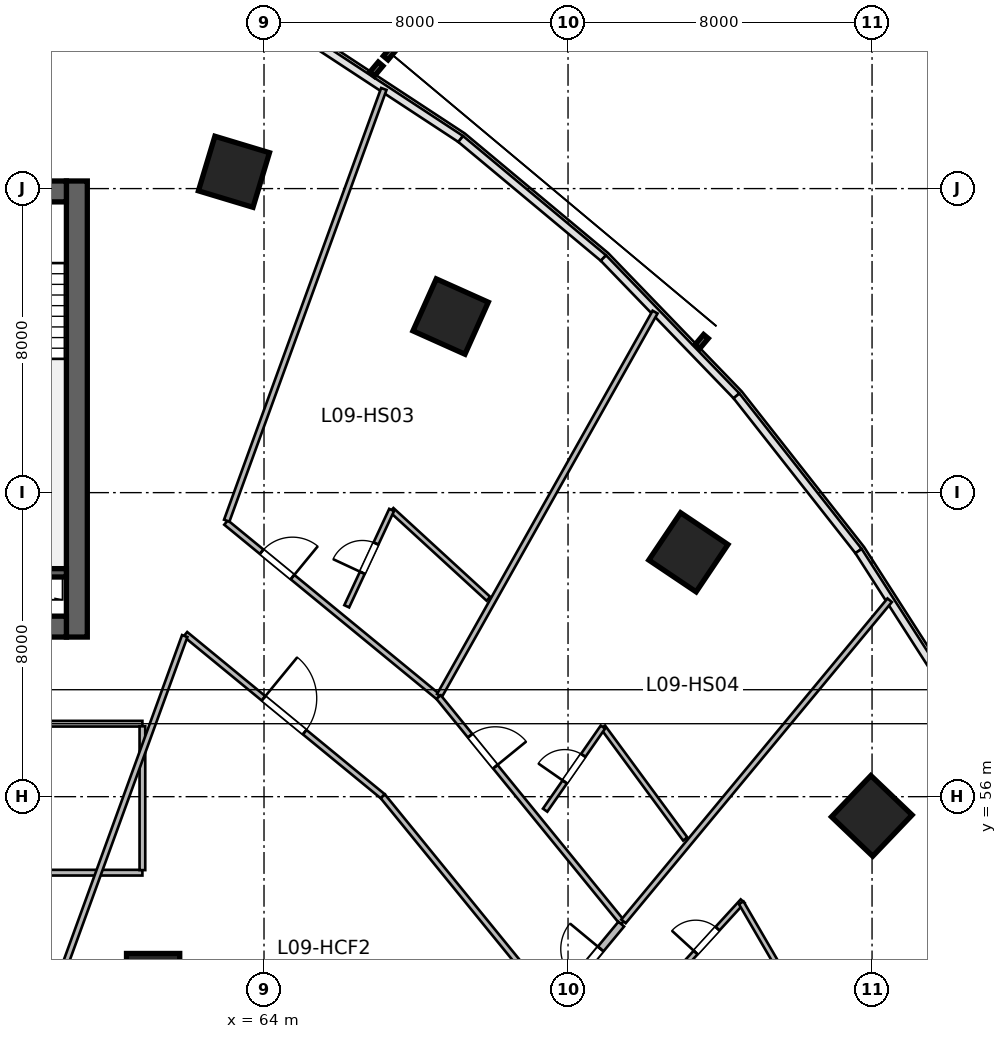
"""IFC4 building model, lengths in metres.
Left out: names, types, materials, properties, quantities, classifications, styles, units other than length and angle.
Written with IfcOpenShell. Run it as: python <this file> out.ifc"""

import sys

from ifc_helpers import new_model, si_unit, direction, frame, frame_2d, origin, origin_2d, place, context, subcontext, project, spatial, rectangle, circle, extrude, source, transform, mapped, element, fill, save


model = new_model("IFC4")
c1 = context("Model", 3, precision=1e-05, world=origin(), true_north=direction((0.0, 1.0)))
c2 = subcontext(c1, "Body", "Model", "MODEL_VIEW")
j1 = project(units=[si_unit("LENGTHUNIT", "METRE"), si_unit("PLANEANGLEUNIT", "RADIAN")], contexts=[c1])
p1 = place(None, origin())
s1 = spatial("IfcSite", under=j1, at=p1, CompositionType="ELEMENT")
p2 = place(p1, origin())
s2 = spatial("IfcBuilding", under=s1, at=p2, CompositionType="ELEMENT")
p3 = place(p2, frame((0.0, 0.0, 46.2)))
s3 = spatial("IfcBuildingStorey", under=s2, at=p3, CompositionType="ELEMENT", Elevation=46.2)
m1 = source(origin(), c2, "Body", "SweptSolid", [
    extrude(rectangle(XDim=12.0, YDim=0.55, at=frame_2d((6.0, 0.0))), origin(), (0.0, 0.0, 1.0), 3.6),
])
p4 = place(p3, frame((59.075, 60.2, 0.0), z_axis=(0.0, 0.0, 1.0), x_axis=(0.0, 1.0, 0.0)))
e1 = element("IfcWall", 1, at=p4, inside=s3, PredefinedType="SHEAR", context=c2, shape_type="MappedRepresentation", body=[
    mapped(m1, transform((0.0, 0.0, 0.0), scale=1.0)),
])
m2 = source(origin(), c2, "Body", "SweptSolid", [
    extrude(rectangle(XDim=21.6, YDim=0.55, at=frame_2d((10.8, 0.0))), origin(), (0.0, 0.0, 1.0), 3.6),
])
p5 = place(p3, frame((37.2, 60.475, 0.0), z_axis=(0.0, 0.0, 1.0), x_axis=(1.0, 0.0, 0.0)))
e2 = element("IfcWall", 2, at=p5, inside=s3, PredefinedType="SHEAR", context=c2, shape_type="MappedRepresentation", body=[
    mapped(m2, transform((0.0, 0.0, 0.0), scale=1.0)),
])
p6 = place(p5, frame((1.1, 0.0, 0.0)))
e3 = element("IfcOpeningElement", 3, at=p6, cuts=e2, PredefinedType="OPENING", context=c2, shape_type="SweptSolid", body=[
    extrude(rectangle(XDim=1.15, YDim=2.15, at=frame_2d((0.575, 1.075))), frame((0.0, 0.285, 0.0), z_axis=(0.0, -1.0, 0.0), x_axis=(1.0, 0.0, 0.0)), (0.0, 0.0, 1.0), 0.57),
])
p7 = place(p5, frame((19.5, 0.0, 0.0)))
e4 = element("IfcOpeningElement", 4, at=p7, cuts=e2, PredefinedType="OPENING", context=c2, shape_type="SweptSolid", body=[
    extrude(rectangle(XDim=0.9, YDim=2.1, at=frame_2d((0.45, 1.05))), frame((0.0, 0.285, 0.0), z_axis=(0.0, -1.0, 0.0), x_axis=(1.0, 0.0, 0.0)), (0.0, 0.0, 1.0), 0.57),
])
p8 = place(p5, frame((12.02, 0.0, 0.0)))
e5 = element("IfcOpeningElement", 5, at=p8, cuts=e2, PredefinedType="OPENING", context=c2, shape_type="SweptSolid", body=[
    extrude(rectangle(XDim=1.6, YDim=2.15, at=frame_2d((0.8, 1.075))), frame((0.0, 0.285, 0.0), z_axis=(0.0, -1.0, 0.0), x_axis=(1.0, 0.0, 0.0)), (0.0, 0.0, 1.0), 0.57),
])
p9 = place(p3, frame((37.2, 71.925, 0.0), z_axis=(0.0, 0.0, 1.0), x_axis=(1.0, 0.0, 0.0)))
e6 = element("IfcWall", 6, at=p9, inside=s3, PredefinedType="SHEAR", context=c2, shape_type="MappedRepresentation", body=[
    mapped(m2, transform((0.0, 0.0, 0.0), scale=1.0)),
])
p10 = place(p9, frame((1.2, 0.0, 0.0)))
e7 = element("IfcOpeningElement", 7, at=p10, cuts=e6, PredefinedType="OPENING", context=c2, shape_type="SweptSolid", body=[
    extrude(rectangle(XDim=0.9, YDim=2.1, at=frame_2d((0.45, 1.05))), frame((0.0, 0.285, 0.0), z_axis=(0.0, -1.0, 0.0), x_axis=(1.0, 0.0, 0.0)), (0.0, 0.0, 1.0), 0.57),
])
p11 = place(p9, frame((14.7, 0.0, 0.0)))
e8 = element("IfcOpeningElement", 8, at=p11, cuts=e6, PredefinedType="OPENING", context=c2, shape_type="SweptSolid", body=[
    extrude(rectangle(XDim=1.2, YDim=2.15, at=frame_2d((0.6, 1.075))), frame((0.0, 0.285, 0.0), z_axis=(0.0, -1.0, 0.0), x_axis=(1.0, 0.0, 0.0)), (0.0, 0.0, 1.0), 0.57),
])
p12 = place(p9, frame((4.15, 0.0, 0.0)))
e9 = element("IfcOpeningElement", 9, at=p12, cuts=e6, PredefinedType="OPENING", context=c2, shape_type="SweptSolid", body=[
    extrude(rectangle(XDim=1.3, YDim=2.15, at=frame_2d((0.65, 1.075))), frame((0.0, 0.285, 0.0), z_axis=(0.0, -1.0, 0.0), x_axis=(1.0, 0.0, 0.0)), (0.0, 0.0, 1.0), 0.57),
])
p13 = place(p9, frame((7.25, 0.0, 0.0)))
e10 = element("IfcOpeningElement", 10, at=p13, cuts=e6, PredefinedType="OPENING", context=c2, shape_type="SweptSolid", body=[
    extrude(rectangle(XDim=0.9, YDim=2.1, at=frame_2d((0.45, 1.05))), frame((0.0, 0.285, 0.0), z_axis=(0.0, -1.0, 0.0), x_axis=(1.0, 0.0, 0.0)), (0.0, 0.0, 1.0), 0.57),
])
p14 = place(p9, frame((10.95, 0.0, 0.0)))
e11 = element("IfcOpeningElement", 11, at=p14, cuts=e6, PredefinedType="OPENING", context=c2, shape_type="SweptSolid", body=[
    extrude(rectangle(XDim=0.9, YDim=2.1, at=frame_2d((0.45, 1.05))), frame((0.0, 0.285, 0.0), z_axis=(0.0, -1.0, 0.0), x_axis=(1.0, 0.0, 0.0)), (0.0, 0.0, 1.0), 0.57),
])
m3 = source(origin(), c2, "Body", "SweptSolid", [
    extrude(rectangle(XDim=3.27, YDim=0.22, at=frame_2d((1.635, 0.0))), origin(), (0.0, 0.0, 1.0), 3.6),
])
p15 = place(p3, frame((55.53, 61.89, 0.0), z_axis=(0.0, 0.0, 1.0), x_axis=(1.0, 0.0, 0.0)))
e12 = element("IfcWall", 12, at=p15, inside=s3, PredefinedType="SHEAR", context=c2, shape_type="MappedRepresentation", body=[
    mapped(m3, transform((0.0, 0.0, 0.0), scale=1.0)),
])
m4 = source(origin(), c2, "Body", "SweptSolid", [
    extrude(rectangle(XDim=1.5, YDim=1.5, at=origin_2d()), origin(), (0.0, 0.0, 1.0), 3.6),
])
p16 = place(p3, frame((63.209, 72.442, 0.0), z_axis=(0.0, 0.0, 1.0), x_axis=(0.288697611798, 0.957420330337, 0.0)))
e13 = element("IfcColumn", 13, at=p16, inside=s3, PredefinedType="COLUMN", context=c2, shape_type="MappedRepresentation", body=[
    mapped(m4, transform((0.0, 0.0, 0.0), scale=1.0)),
])
m5 = source(origin(), c2, "Body", "SweptSolid", [
    extrude(circle(Radius=0.7, at=origin_2d()), origin(), (0.0, 0.0, 1.0), 3.6),
])
p17 = place(p3, frame((61.082, 51.175, 0.0), z_axis=(0.0, 0.0, 1.0), x_axis=(0.409126902895, 0.912477494148, 0.0)))
e14 = element("IfcColumn", 14, at=p17, inside=s3, PredefinedType="COLUMN", context=c2, shape_type="MappedRepresentation", body=[
    mapped(m5, transform((0.0, 0.0, 0.0), scale=1.0)),
])
for number, where, z_axis, x_axis in (
    (15, (68.91, 68.633, 0.0), (0.0, 0.0, 1.0), (0.409, 0.912, 0.0)),
    (16, (75.167, 62.43, 0.0), (0.0, 0.0, 1.0), (0.558, 0.83, 0.0)),
    (17, (79.993, 55.494, 0.0), (0.0, 0.0, 1.0), (0.691, 0.723, 0.0)),
):
    element("IfcColumn", number, at=place(p3, frame(where, z_axis=z_axis, x_axis=x_axis)), inside=s3, PredefinedType="COLUMN", context=c2, shape_type="MappedRepresentation", body=[
        mapped(m4, transform((0.0, 0.0, 0.0), scale=1.0)),
    ])
m6 = source(origin(), c2, "Body", "SweptSolid", [
    extrude(rectangle(XDim=6.6, YDim=0.15, at=frame_2d((3.3, 0.0))), origin(), (0.0, 0.0, 1.0), 2.803),
])
p18 = place(p3, frame((54.2, 54.0, 0.0), z_axis=(0.0, 0.0, 1.0), x_axis=(1.0, 0.0, 0.0)))
e18 = element("IfcWall", 18, at=p18, inside=s3, PredefinedType="PARTITIONING", context=c2, shape_type="MappedRepresentation", body=[
    mapped(m6, transform((0.0, 0.0, 0.0), scale=1.0)),
])
m7 = source(origin(), c2, "Body", "SweptSolid", [
    extrude(rectangle(XDim=6.6, YDim=0.15, at=frame_2d((3.3, 0.0))), origin(), (0.0, 0.0, 1.0), 3.36),
])
p19 = place(p3, frame((54.2, 57.92, 0.0), z_axis=(0.0, 0.0, 1.0), x_axis=(1.0, 0.0, 0.0)))
e19 = element("IfcWall", 19, at=p19, inside=s3, PredefinedType="PARTITIONING", context=c2, shape_type="MappedRepresentation", body=[
    mapped(m7, transform((0.0, 0.0, 0.0), scale=1.0)),
])
p20 = place(p19, frame((2.825, 0.0, 0.0)))
e20 = element("IfcOpeningElement", 20, at=p20, cuts=e19, PredefinedType="OPENING", context=c2, shape_type="SweptSolid", body=[
    extrude(rectangle(XDim=0.95, YDim=2.1, at=frame_2d((0.475, 1.05))), frame((0.0, 0.085, 0.0), z_axis=(0.0, -1.0, 0.0), x_axis=(1.0, 0.0, 0.0)), (0.0, 0.0, 1.0), 0.17),
])
m8 = source(origin(), c2, "Body", "SweptSolid", [
    extrude(rectangle(XDim=3.785, YDim=0.15, at=frame_2d((1.893, 0.0))), origin(), (0.0, 0.0, 1.0), 3.36),
])
p21 = place(p3, frame((60.8, 54.067, 0.0), z_axis=(0.0, 0.0, 1.0), x_axis=(0.0, 1.0, 0.0)))
e21 = element("IfcWall", 21, at=p21, inside=s3, PredefinedType="PARTITIONING", context=c2, shape_type="MappedRepresentation", body=[
    mapped(m8, transform((0.0, 0.0, 0.0), scale=1.0)),
])
m9 = source(origin(), c2, "Body", "SweptSolid", [
    extrude(rectangle(XDim=7.237, YDim=0.15, at=frame_2d((3.618, 0.0))), origin(), (0.0, 0.0, 1.0), 3.36),
])
p22 = place(p3, frame((63.001, 63.214, 0.0), z_axis=(0.0, 0.0, 1.0), x_axis=(0.772813707793, -0.634632943557, 0.0)))
e22 = element("IfcWall", 22, at=p22, inside=s3, PredefinedType="PARTITIONING", context=c2, shape_type="MappedRepresentation", body=[
    mapped(m9, transform((0.0, 0.0, 0.0), scale=1.0)),
])
p23 = place(p22, frame((1.212, 0.0, 0.0)))
e23 = element("IfcOpeningElement", 23, at=p23, cuts=e22, PredefinedType="OPENING", context=c2, shape_type="SweptSolid", body=[
    extrude(rectangle(XDim=1.05, YDim=2.15, at=frame_2d((0.525, 1.075))), frame((0.0, 0.085, 0.0), z_axis=(0.0, -1.0, 0.0), x_axis=(1.0, 0.0, 0.0)), (0.0, 0.0, 1.0), 0.17),
])
m10 = source(origin(), c2, "Body", "SweptSolid", [
    extrude(rectangle(XDim=12.088, YDim=0.15, at=frame_2d((6.044, 0.0))), origin(), (0.0, 0.0, 1.0), 3.36),
])
p24 = place(p3, frame((63.019, 63.262, 0.0), z_axis=(0.0, 0.0, 1.0), x_axis=(0.34203007529, 0.939689005787, 0.0)))
e24 = element("IfcWall", 24, at=p24, inside=s3, PredefinedType="PARTITIONING", context=c2, shape_type="MappedRepresentation", body=[
    mapped(m10, transform((0.0, 0.0, 0.0), scale=1.0)),
])
m11 = source(origin(), c2, "Body", "SweptSolid", [
    extrude(rectangle(XDim=11.573, YDim=0.15, at=frame_2d((5.786, 0.0))), origin(), (0.0, 0.0, 1.0), 3.36),
])
p25 = place(p3, frame((68.618, 58.664, 0.0), z_axis=(0.0, 0.0, 1.0), x_axis=(0.490161073951, 0.871631872744, 0.0)))
e25 = element("IfcWall", 25, at=p25, inside=s3, PredefinedType="PARTITIONING", context=c2, shape_type="MappedRepresentation", body=[
    mapped(m11, transform((0.0, 0.0, 0.0), scale=1.0)),
])
m12 = source(origin(), c2, "Body", "SweptSolid", [
    extrude(rectangle(XDim=3.456, YDim=0.14, at=frame_2d((1.728, 0.0))), origin(), (0.0, 0.0, 1.0), 3.36),
])
p26 = place(p3, frame((67.358, 63.544, 0.0), z_axis=(0.0, 0.0, 1.0), x_axis=(0.736860870293, -0.676044420013, 0.0)))
e26 = element("IfcWall", 26, at=p26, inside=s3, PredefinedType="PARTITIONING", context=c2, shape_type="MappedRepresentation", body=[
    mapped(m12, transform((0.0, 0.0, 0.0), scale=1.0)),
])
m13 = source(origin(), c2, "Body", "SweptSolid", [
    extrude(rectangle(XDim=2.796, YDim=0.14, at=frame_2d((1.398, 0.0))), origin(), (0.0, 0.0, 1.0), 3.36),
])
p27 = place(p3, frame((66.177, 61.009, 0.0), z_axis=(0.0, 0.0, 1.0), x_axis=(0.422316594955, 0.906448395456, 0.0)))
e27 = element("IfcWall", 27, at=p27, inside=s3, PredefinedType="PARTITIONING", context=c2, shape_type="MappedRepresentation", body=[
    mapped(m13, transform((0.0, 0.0, 0.0), scale=1.0)),
])
p28 = place(p27, frame((0.973, 0.0, 0.0)))
e28 = element("IfcOpeningElement", 28, at=p28, cuts=e27, PredefinedType="OPENING", context=c2, shape_type="SweptSolid", body=[
    extrude(rectangle(XDim=0.85, YDim=2.05, at=frame_2d((0.425, 1.025))), frame((0.0, 0.08, 0.0), z_axis=(0.0, -1.0, 0.0), x_axis=(1.0, 0.0, 0.0)), (0.0, 0.0, 1.0), 0.16),
])
m14 = source(origin(), c2, "Body", "SweptSolid", [
    extrude(rectangle(XDim=7.659, YDim=0.15, at=frame_2d((3.829, 0.0))), origin(), (0.0, 0.0, 1.0), 3.36),
])
p29 = place(p3, frame((68.594, 58.621, 0.0), z_axis=(0.0, 0.0, 1.0), x_axis=(0.631489868862, -0.775384127723, 0.0)))
e29 = element("IfcWall", 29, at=p29, inside=s3, PredefinedType="PARTITIONING", context=c2, shape_type="MappedRepresentation", body=[
    mapped(m14, transform((0.0, 0.0, 0.0), scale=1.0)),
])
p30 = place(p29, frame((1.313, 0.0, 0.0)))
e30 = element("IfcOpeningElement", 30, at=p30, cuts=e29, PredefinedType="OPENING", context=c2, shape_type="SweptSolid", body=[
    extrude(rectangle(XDim=1.05, YDim=2.15, at=frame_2d((0.525, 1.075))), frame((0.0, 0.085, 0.0), z_axis=(0.0, -1.0, 0.0), x_axis=(1.0, 0.0, 0.0)), (0.0, 0.0, 1.0), 0.17),
])
m15 = source(origin(), c2, "Body", "SweptSolid", [
    extrude(rectangle(XDim=10.975, YDim=0.15, at=frame_2d((5.487, 0.0))), origin(), (0.0, 0.0, 1.0), 3.36),
])
p31 = place(p3, frame((73.46, 52.719, 0.0), z_axis=(0.0, 0.0, 1.0), x_axis=(0.638125265812, 0.769932558821, 0.0)))
e31 = element("IfcWall", 31, at=p31, inside=s3, PredefinedType="PARTITIONING", context=c2, shape_type="MappedRepresentation", body=[
    mapped(m15, transform((0.0, 0.0, 0.0), scale=1.0)),
])
m16 = source(origin(), c2, "Body", "SweptSolid", [
    extrude(rectangle(XDim=3.656, YDim=0.14, at=frame_2d((1.828, 0.0))), origin(), (0.0, 0.0, 1.0), 3.36),
])
p32 = place(p3, frame((72.918, 57.831, 0.0), z_axis=(0.0, 0.0, 1.0), x_axis=(0.592700141555, -0.805423206892, 0.0)))
e32 = element("IfcWall", 32, at=p32, inside=s3, PredefinedType="PARTITIONING", context=c2, shape_type="MappedRepresentation", body=[
    mapped(m16, transform((0.0, 0.0, 0.0), scale=1.0)),
])
m17 = source(origin(), c2, "Body", "SweptSolid", [
    extrude(rectangle(XDim=2.663, YDim=0.14, at=frame_2d((1.332, 0.0))), origin(), (0.0, 0.0, 1.0), 3.36),
])
p33 = place(p3, frame((71.397, 55.645, 0.0), z_axis=(0.0, 0.0, 1.0), x_axis=(0.570905989724, 0.821015438891, 0.0)))
e33 = element("IfcWall", 33, at=p33, inside=s3, PredefinedType="PARTITIONING", context=c2, shape_type="MappedRepresentation", body=[
    mapped(m17, transform((0.0, 0.0, 0.0), scale=1.0)),
])
p34 = place(p33, frame((0.906, 0.0, 0.0)))
e34 = element("IfcOpeningElement", 34, at=p34, cuts=e33, PredefinedType="OPENING", context=c2, shape_type="SweptSolid", body=[
    extrude(rectangle(XDim=0.85, YDim=2.05, at=frame_2d((0.425, 1.025))), frame((0.0, 0.08, 0.0), z_axis=(0.0, -1.0, 0.0), x_axis=(1.0, 0.0, 0.0)), (0.0, 0.0, 1.0), 0.16),
])
m18 = source(origin(), c2, "Body", "SweptSolid", [
    extrude(rectangle(XDim=6.721, YDim=0.15, at=frame_2d((3.361, 0.0))), origin(), (0.0, 0.0, 1.0), 3.36),
])
p35 = place(p3, frame((61.931, 60.275, 0.0), z_axis=(0.0, 0.0, 1.0), x_axis=(0.772828051199, -0.63461547671, 0.0)))
e35 = element("IfcWall", 35, at=p35, inside=s3, PredefinedType="PARTITIONING", context=c2, shape_type="MappedRepresentation", body=[
    mapped(m18, transform((0.0, 0.0, 0.0), scale=1.0)),
])
p36 = place(p35, frame((2.66, 0.0, 0.0)))
e36 = element("IfcOpeningElement", 36, at=p36, cuts=e35, PredefinedType="OPENING", context=c2, shape_type="SweptSolid", body=[
    extrude(rectangle(XDim=1.4, YDim=2.15, at=frame_2d((0.7, 1.075))), frame((0.0, 0.085, 0.0), z_axis=(0.0, -1.0, 0.0), x_axis=(1.0, 0.0, 0.0)), (0.0, 0.0, 1.0), 0.17),
])
m19 = source(origin(), c2, "Body", "SweptSolid", [
    extrude(rectangle(XDim=7.113, YDim=0.15, at=frame_2d((3.556, 0.0))), origin(), (0.0, 0.0, 1.0), 3.36),
])
p37 = place(p3, frame((67.126, 56.01, 0.0), z_axis=(0.0, 0.0, 1.0), x_axis=(0.63149032532, -0.775383755974, 0.0)))
e37 = element("IfcWall", 37, at=p37, inside=s3, PredefinedType="PARTITIONING", context=c2, shape_type="MappedRepresentation", body=[
    mapped(m19, transform((0.0, 0.0, 0.0), scale=1.0)),
])
m20 = source(origin(), c2, "Body", "SweptSolid", [
    extrude(rectangle(XDim=12.196, YDim=0.15, at=frame_2d((6.098, 0.0))), origin(), (0.0, 0.0, 1.0), 3.36),
])
p38 = place(p3, frame((57.742, 48.766, 0.0), z_axis=(0.0, 0.0, 1.0), x_axis=(0.342022711534, 0.939691686031, 0.0)))
e38 = element("IfcWall", 38, at=p38, inside=s3, PredefinedType="PARTITIONING", context=c2, shape_type="MappedRepresentation", body=[
    mapped(m20, transform((0.0, 0.0, 0.0), scale=1.0)),
])
m21 = source(origin(), c2, "Body", "SweptSolid", [
    extrude(rectangle(XDim=2.748, YDim=0.195, at=frame_2d((1.374, 0.0))), origin(), (0.0, 0.0, 1.0), 3.36),
])
p39 = place(p3, frame((71.647, 50.531, 0.0), z_axis=(0.0, 0.0, 1.0), x_axis=(0.638111168284, 0.769944242729, 0.0)))
e39 = element("IfcWall", 39, at=p39, inside=s3, PredefinedType="PARTITIONING", context=c2, shape_type="MappedRepresentation", body=[
    mapped(m21, transform((0.0, 0.0, 0.0), scale=1.0)),
])
p40 = place(p39, frame((0.849, 0.0, 0.0)))
e40 = element("IfcOpeningElement", 40, at=p40, cuts=e39, PredefinedType="OPENING", context=c2, shape_type="SweptSolid", body=[
    extrude(rectangle(XDim=1.05, YDim=2.15, at=frame_2d((0.525, 1.075))), frame((0.0, 0.107, 0.0), z_axis=(0.0, -1.0, 0.0), x_axis=(1.0, 0.0, 0.0)), (0.0, 0.0, 1.0), 0.215),
])
m22 = source(origin(), c2, "Body", "SweptSolid", [
    extrude(rectangle(XDim=2.812, YDim=0.14, at=frame_2d((1.406, 0.0))), origin(), (0.0, 0.0, 1.0), 3.36),
])
p41 = place(p3, frame((74.697, 51.177, 0.0), z_axis=(0.0, 0.0, 1.0), x_axis=(0.675119025852, 0.737708818527, 0.0)))
e41 = element("IfcWall", 41, at=p41, inside=s3, PredefinedType="PARTITIONING", context=c2, shape_type="MappedRepresentation", body=[
    mapped(m22, transform((0.0, 0.0, 0.0), scale=1.0)),
])
p42 = place(p41, frame((0.981, 0.0, 0.0)))
e42 = element("IfcOpeningElement", 42, at=p42, cuts=e41, PredefinedType="OPENING", context=c2, shape_type="SweptSolid", body=[
    extrude(rectangle(XDim=0.85, YDim=2.05, at=frame_2d((0.425, 1.025))), frame((0.0, 0.08, 0.0), z_axis=(0.0, -1.0, 0.0), x_axis=(1.0, 0.0, 0.0)), (0.0, 0.0, 1.0), 0.16),
])
m23 = source(origin(), c2, "Body", "SweptSolid", [
    extrude(rectangle(XDim=2.045, YDim=0.14, at=frame_2d((1.022, 0.0))), origin(), (0.0, 0.0, 1.0), 3.36),
])
p43 = place(p3, frame((76.557, 53.209, 0.0), z_axis=(0.0, 0.0, 1.0), x_axis=(0.5023112139, -0.864686905411, 0.0)))
e43 = element("IfcWall", 43, at=p43, inside=s3, PredefinedType="PARTITIONING", context=c2, shape_type="MappedRepresentation", body=[
    mapped(m23, transform((0.0, 0.0, 0.0), scale=1.0)),
])
m24 = source(origin(), c2, "Body", "SweptSolid", [
    extrude(rectangle(XDim=1.05, YDim=2.15, at=frame_2d((0.525, 1.075))), frame((0.0, 0.025, 0.0), z_axis=(0.0, -1.0, 0.0), x_axis=(1.0, 0.0, 0.0)), (0.0, 0.0, 1.0), 0.05),
])
p44 = place(p23, origin())
e44 = element("IfcDoor", 44, at=p44, inside=s3, OperationType="SINGLE_SWING_RIGHT", PredefinedType="DOOR", context=c2, shape_type="MappedRepresentation", body=[
    mapped(m24, transform((0.0, 0.0, 0.0), scale=1.0)),
])
fill(e23, e44)
m25 = source(origin(), c2, "Body", "SweptSolid", [
    extrude(rectangle(XDim=0.85, YDim=2.05, at=frame_2d((0.425, 1.025))), frame((0.0, 0.025, 0.0), z_axis=(0.0, -1.0, 0.0), x_axis=(1.0, 0.0, 0.0)), (0.0, 0.0, 1.0), 0.05),
])
p45 = place(p28, origin())
e45 = element("IfcDoor", 45, at=p45, inside=s3, OperationType="SINGLE_SWING_LEFT", PredefinedType="DOOR", context=c2, shape_type="MappedRepresentation", body=[
    mapped(m25, transform((0.0, 0.0, 0.0), scale=1.0)),
])
fill(e28, e45)
p46 = place(p30, origin())
e46 = element("IfcDoor", 46, at=p46, inside=s3, OperationType="SINGLE_SWING_RIGHT", PredefinedType="DOOR", context=c2, shape_type="MappedRepresentation", body=[
    mapped(m24, transform((0.0, 0.0, 0.0), scale=1.0)),
])
fill(e30, e46)
p47 = place(p34, origin())
e47 = element("IfcDoor", 47, at=p47, inside=s3, OperationType="SINGLE_SWING_LEFT", PredefinedType="DOOR", context=c2, shape_type="MappedRepresentation", body=[
    mapped(m25, transform((0.0, 0.0, 0.0), scale=1.0)),
])
fill(e34, e47)
m26 = source(origin(), c2, "Body", "SweptSolid", [
    extrude(rectangle(XDim=1.4, YDim=2.15, at=frame_2d((0.7, 1.075))), frame((0.0, 0.025, 0.0), z_axis=(0.0, -1.0, 0.0), x_axis=(1.0, 0.0, 0.0)), (0.0, 0.0, 1.0), 0.05),
])
p48 = place(p36, origin())
e48 = element("IfcDoor", 48, at=p48, inside=s3, OperationType="SINGLE_SWING_LEFT", PredefinedType="DOOR", context=c2, shape_type="MappedRepresentation", body=[
    mapped(m26, transform((0.0, 0.0, 0.0), scale=1.0)),
])
fill(e36, e48)
p49 = place(p40, origin())
e49 = element("IfcDoor", 49, at=p49, inside=s3, OperationType="SINGLE_SWING_RIGHT", PredefinedType="DOOR", context=c2, shape_type="MappedRepresentation", body=[
    mapped(m24, transform((0.0, 0.0, 0.0), scale=1.0)),
])
fill(e40, e49)
p50 = place(p42, origin())
e50 = element("IfcDoor", 50, at=p50, inside=s3, OperationType="SINGLE_SWING_LEFT", PredefinedType="DOOR", context=c2, shape_type="MappedRepresentation", body=[
    mapped(m25, transform((0.0, 0.0, 0.0), scale=1.0)),
])
fill(e42, e50)
save(model, sys.argv[1])
